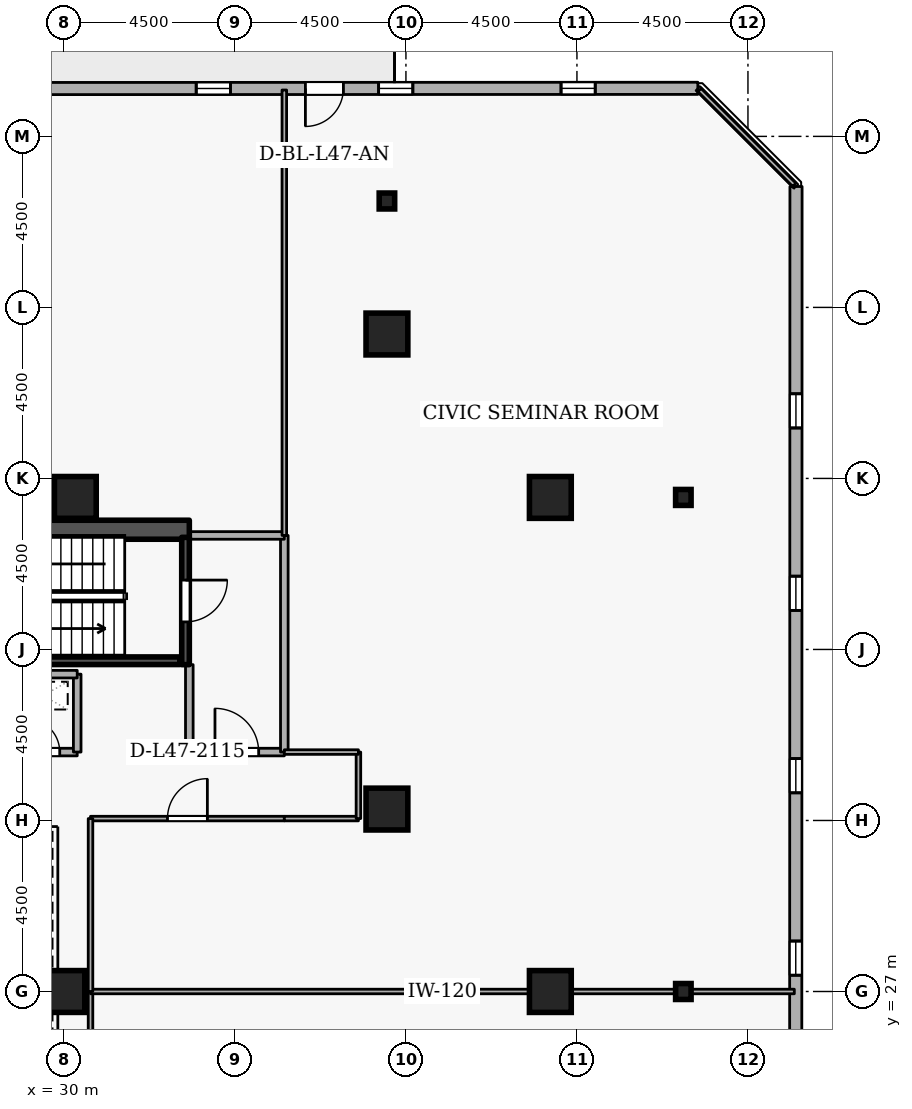
"""IFC4 building model, lengths in metres.
Left out: names, types, materials, properties, quantities, classifications, styles, units other than length and angle.
Written with IfcOpenShell. Run it as: python <this file> out.ifc"""

import sys

from ifc_helpers import new_model, si_unit, direction, frame, frame_2d, origin, origin_2d, place, context, subcontext, project, spatial, rectangle, i_section, extrude, element, fill, save


model = new_model("IFC4")
c1 = context("Model", 3, precision=1e-05, world=origin(), true_north=direction((0.0, 1.0)))
c2 = subcontext(c1, "Body", "Model", "MODEL_VIEW")
j1 = project(units=[si_unit("LENGTHUNIT", "METRE"), si_unit("PLANEANGLEUNIT", "RADIAN")], contexts=[c1])
p1 = place(None, origin())
s1 = spatial("IfcSite", under=j1, at=p1, CompositionType="ELEMENT")
p2 = place(p1, origin())
s2 = spatial("IfcBuilding", under=s1, at=p2, CompositionType="ELEMENT")
p3 = place(p2, frame((0.0, 0.0, 178.5)))
s3 = spatial("IfcBuildingStorey", under=s2, at=p3, CompositionType="ELEMENT", Elevation=178.5)
p4 = place(p3, frame((17.7, 39.15, 0.0), z_axis=(0.0, 0.0, 1.0), x_axis=(1.0, 0.0, 0.0)))
e1 = element("IfcWall", 1, at=p4, inside=s3, PredefinedType="SHEAR", context=c2, shape_type="SweptSolid", body=[
    extrude(rectangle(XDim=15.6, YDim=0.5, at=frame_2d((7.8, 0.0))), origin(), (0.0, 0.0, 1.0), 3.6),
])
for number, where, z_axis, x_axis in (
    (2, (42.8, 27.0, 0.0), (0.0, 0.0, 1.0), (1.0, 0.0, 0.0)),
    (3, (42.8, 40.0, 0.0), (0.0, 0.0, 1.0), (1.0, 0.0, 0.0)),
    (4, (38.5, 44.3, 0.0), (0.0, 0.0, 1.0), (1.0, 0.0, 0.0)),
    (5, (38.5, 31.8, 0.0), (0.0, 0.0, 1.0), (1.0, 0.0, 0.0)),
    (6, (30.3, 40.0, 0.0), (0.0, 0.0, 1.0), (1.0, 0.0, 0.0)),
    (7, (30.0, 27.0, 0.0), (0.0, 0.0, 1.0), (1.0, 0.0, 0.0)),
):
    element("IfcColumn", number, at=place(p3, frame(where, z_axis=z_axis, x_axis=x_axis)), inside=s3, PredefinedType="COLUMN", context=c2, shape_type="SweptSolid", body=[
        extrude(rectangle(XDim=1.1, YDim=1.1, at=origin_2d()), origin(), (0.0, 0.0, 1.0), 3.6),
    ])
for number, where, z_axis, x_axis in (
    (8, (46.3, 27.0, 0.0), (0.0, 0.0, 1.0), (1.0, 0.0, 0.0)),
    (9, (46.3, 40.0, 0.0), (0.0, 0.0, 1.0), (1.0, 0.0, 0.0)),
    (10, (38.5, 47.8, 0.0), (0.0, 0.0, 1.0), (1.0, 0.0, 0.0)),
):
    element("IfcColumn", number, at=place(p3, frame(where, z_axis=z_axis, x_axis=x_axis)), inside=s3, PredefinedType="COLUMN", context=c2, shape_type="SweptSolid", body=[
        extrude(i_section(OverallWidth=0.407, OverallDepth=0.419, WebThickness=0.031, FlangeThickness=0.049, FilletRadius=0.015, at=origin_2d()), origin(), (0.0, 0.0, 1.0), 3.6),
    ])
p5 = place(p3, frame((49.254, 15.128, 0.0), z_axis=(0.0, 0.0, 1.0), x_axis=(0.000332378036, 0.999999944762, 0.0)))
e11 = element("IfcWall", 11, at=p5, inside=s3, PredefinedType="STANDARD", context=c2, shape_type="SweptSolid", body=[
    extrude(rectangle(XDim=33.054, YDim=0.32, at=frame_2d((16.527, 0.0))), origin(), (0.0, 0.0, 1.0), 2.7),
])
p6 = place(p5, frame((2.7, 0.0, 0.72)))
e12 = element("IfcOpeningElement", 12, at=p6, cuts=e11, PredefinedType="OPENING", context=c2, shape_type="SweptSolid", body=[
    extrude(rectangle(XDim=0.9, YDim=1.75, at=frame_2d((0.45, 0.875))), frame((0.0, 0.17, 0.0), z_axis=(0.0, -1.0, 0.0), x_axis=(1.0, 0.0, 0.0)), (0.0, 0.0, 1.0), 0.34),
])
p7 = place(p5, frame((7.5, 0.0, 0.72)))
e13 = element("IfcOpeningElement", 13, at=p7, cuts=e11, PredefinedType="OPENING", context=c2, shape_type="SweptSolid", body=[
    extrude(rectangle(XDim=0.9, YDim=1.75, at=frame_2d((0.45, 0.875))), frame((0.0, 0.17, 0.0), z_axis=(0.0, -1.0, 0.0), x_axis=(1.0, 0.0, 0.0)), (0.0, 0.0, 1.0), 0.34),
])
p8 = place(p5, frame((12.3, 0.0, 0.72)))
e14 = element("IfcOpeningElement", 14, at=p8, cuts=e11, PredefinedType="OPENING", context=c2, shape_type="SweptSolid", body=[
    extrude(rectangle(XDim=0.9, YDim=1.75, at=frame_2d((0.45, 0.875))), frame((0.0, 0.17, 0.0), z_axis=(0.0, -1.0, 0.0), x_axis=(1.0, 0.0, 0.0)), (0.0, 0.0, 1.0), 0.34),
])
p9 = place(p5, frame((17.1, 0.0, 0.72)))
e15 = element("IfcOpeningElement", 15, at=p9, cuts=e11, PredefinedType="OPENING", context=c2, shape_type="SweptSolid", body=[
    extrude(rectangle(XDim=0.9, YDim=1.75, at=frame_2d((0.45, 0.875))), frame((0.0, 0.17, 0.0), z_axis=(0.0, -1.0, 0.0), x_axis=(1.0, 0.0, 0.0)), (0.0, 0.0, 1.0), 0.34),
])
p10 = place(p5, frame((21.9, 0.0, 0.72)))
e16 = element("IfcOpeningElement", 16, at=p10, cuts=e11, PredefinedType="OPENING", context=c2, shape_type="SweptSolid", body=[
    extrude(rectangle(XDim=0.9, YDim=1.75, at=frame_2d((0.45, 0.875))), frame((0.0, 0.17, 0.0), z_axis=(0.0, -1.0, 0.0), x_axis=(1.0, 0.0, 0.0)), (0.0, 0.0, 1.0), 0.34),
])
p11 = place(p5, frame((26.7, 0.0, 0.72)))
e17 = element("IfcOpeningElement", 17, at=p11, cuts=e11, PredefinedType="OPENING", context=c2, shape_type="SweptSolid", body=[
    extrude(rectangle(XDim=0.9, YDim=1.75, at=frame_2d((0.45, 0.875))), frame((0.0, 0.17, 0.0), z_axis=(0.0, -1.0, 0.0), x_axis=(1.0, 0.0, 0.0)), (0.0, 0.0, 1.0), 0.34),
])
p12 = place(p3, frame((46.681, 50.765, 0.0), z_axis=(0.0, 0.0, 1.0), x_axis=(-0.999999944762, -0.000332378036, 0.0)))
e18 = element("IfcWall", 18, at=p12, inside=s3, PredefinedType="STANDARD", context=c2, shape_type="SweptSolid", body=[
    extrude(rectangle(XDim=33.054, YDim=0.32, at=frame_2d((16.527, 0.0))), origin(), (0.0, 0.0, 1.0), 2.7),
])
p13 = place(p12, frame((9.327, 0.0, 0.0)))
e19 = element("IfcOpeningElement", 19, at=p13, cuts=e18, PredefinedType="OPENING", context=c2, shape_type="SweptSolid", body=[
    extrude(rectangle(XDim=1.0, YDim=2.08, at=frame_2d((0.5, 1.04))), frame((0.0, 0.17, 0.0), z_axis=(0.0, -1.0, 0.0), x_axis=(1.0, 0.0, 0.0)), (0.0, 0.0, 1.0), 0.34),
])
p14 = place(p12, frame((2.7, 0.0, 0.72)))
e20 = element("IfcOpeningElement", 20, at=p14, cuts=e18, PredefinedType="OPENING", context=c2, shape_type="SweptSolid", body=[
    extrude(rectangle(XDim=0.9, YDim=1.75, at=frame_2d((0.45, 0.875))), frame((0.0, 0.17, 0.0), z_axis=(0.0, -1.0, 0.0), x_axis=(1.0, 0.0, 0.0)), (0.0, 0.0, 1.0), 0.34),
])
p15 = place(p12, frame((7.5, 0.0, 0.72)))
e21 = element("IfcOpeningElement", 21, at=p15, cuts=e18, PredefinedType="OPENING", context=c2, shape_type="SweptSolid", body=[
    extrude(rectangle(XDim=0.9, YDim=1.75, at=frame_2d((0.45, 0.875))), frame((0.0, 0.17, 0.0), z_axis=(0.0, -1.0, 0.0), x_axis=(1.0, 0.0, 0.0)), (0.0, 0.0, 1.0), 0.34),
])
p16 = place(p12, frame((12.3, 0.0, 0.72)))
e22 = element("IfcOpeningElement", 22, at=p16, cuts=e18, PredefinedType="OPENING", context=c2, shape_type="SweptSolid", body=[
    extrude(rectangle(XDim=0.9, YDim=1.75, at=frame_2d((0.45, 0.875))), frame((0.0, 0.17, 0.0), z_axis=(0.0, -1.0, 0.0), x_axis=(1.0, 0.0, 0.0)), (0.0, 0.0, 1.0), 0.34),
])
p17 = place(p12, frame((17.1, 0.0, 0.72)))
e23 = element("IfcOpeningElement", 23, at=p17, cuts=e18, PredefinedType="OPENING", context=c2, shape_type="SweptSolid", body=[
    extrude(rectangle(XDim=0.9, YDim=1.75, at=frame_2d((0.45, 0.875))), frame((0.0, 0.17, 0.0), z_axis=(0.0, -1.0, 0.0), x_axis=(1.0, 0.0, 0.0)), (0.0, 0.0, 1.0), 0.34),
])
p18 = place(p12, frame((21.9, 0.0, 0.72)))
e24 = element("IfcOpeningElement", 24, at=p18, cuts=e18, PredefinedType="OPENING", context=c2, shape_type="SweptSolid", body=[
    extrude(rectangle(XDim=0.9, YDim=1.75, at=frame_2d((0.45, 0.875))), frame((0.0, 0.17, 0.0), z_axis=(0.0, -1.0, 0.0), x_axis=(1.0, 0.0, 0.0)), (0.0, 0.0, 1.0), 0.34),
])
p19 = place(p12, frame((26.7, 0.0, 0.72)))
e25 = element("IfcOpeningElement", 25, at=p19, cuts=e18, PredefinedType="OPENING", context=c2, shape_type="SweptSolid", body=[
    extrude(rectangle(XDim=0.9, YDim=1.75, at=frame_2d((0.45, 0.875))), frame((0.0, 0.17, 0.0), z_axis=(0.0, -1.0, 0.0), x_axis=(1.0, 0.0, 0.0)), (0.0, 0.0, 1.0), 0.34),
])
p20 = place(p3, frame((33.2, 38.95, 0.0), z_axis=(0.0, 0.0, 1.0), x_axis=(0.0, -1.0, 0.0)))
e26 = element("IfcWall", 26, at=p20, inside=s3, PredefinedType="SHEAR", context=c2, shape_type="SweptSolid", body=[
    extrude(rectangle(XDim=3.35, YDim=0.2, at=frame_2d((1.675, 0.0))), origin(), (0.0, 0.0, 1.0), 3.6),
])
p21 = place(p20, frame((1.125, 0.0, 0.0)))
e27 = element("IfcOpeningElement", 27, at=p21, cuts=e26, PredefinedType="OPENING", context=c2, shape_type="SweptSolid", body=[
    extrude(rectangle(XDim=1.1, YDim=2.1, at=frame_2d((0.55, 1.05))), frame((0.0, 0.11, 0.0), z_axis=(0.0, -1.0, 0.0), x_axis=(1.0, 0.0, 0.0)), (0.0, 0.0, 1.0), 0.22),
])
p22 = place(p3, frame((25.95, 35.703, 0.0), z_axis=(0.0, 0.0, 1.0), x_axis=(1.0, 0.0, 0.0)))
e28 = element("IfcWall", 28, at=p22, inside=s3, PredefinedType="SHEAR", context=c2, shape_type="SweptSolid", body=[
    extrude(rectangle(XDim=7.1, YDim=0.2, at=frame_2d((3.55, 0.0))), origin(), (0.0, 0.0, 1.0), 3.6),
])
p23 = place(p3, frame((33.3, 33.3, 0.0), z_axis=(0.0, 0.0, 1.0), x_axis=(1.0, 0.0, 0.0)))
e29 = element("IfcWall", 29, at=p23, inside=s3, PredefinedType="STANDARD", context=c2, shape_type="SweptSolid", body=[
    extrude(rectangle(XDim=2.5, YDim=0.2, at=frame_2d((1.25, 0.0))), origin(), (0.0, 0.0, 1.0), 3.34),
])
p24 = place(p23, frame((0.675, 0.0, 0.0)))
e30 = element("IfcOpeningElement", 30, at=p24, cuts=e29, PredefinedType="OPENING", context=c2, shape_type="SweptSolid", body=[
    extrude(rectangle(XDim=1.15, YDim=2.1, at=frame_2d((0.575, 1.05))), frame((0.0, 0.11, 0.0), z_axis=(0.0, -1.0, 0.0), x_axis=(1.0, 0.0, 0.0)), (0.0, 0.0, 1.0), 0.22),
])
p25 = place(p3, frame((35.8, 33.3, 0.0), z_axis=(0.0, 0.0, 1.0), x_axis=(0.0, 1.0, 0.0)))
e31 = element("IfcWall", 31, at=p25, inside=s3, PredefinedType="STANDARD", context=c2, shape_type="SweptSolid", body=[
    extrude(rectangle(XDim=5.7, YDim=0.2, at=frame_2d((2.85, 0.0))), origin(), (0.0, 0.0, 1.0), 3.34),
])
p26 = place(p3, frame((35.8, 39.0, 0.0), z_axis=(0.0, 0.0, 1.0), x_axis=(-1.0, 0.0, 0.0)))
e32 = element("IfcWall", 32, at=p26, inside=s3, PredefinedType="STANDARD", context=c2, shape_type="SweptSolid", body=[
    extrude(rectangle(XDim=2.5, YDim=0.2, at=frame_2d((1.25, 0.0))), origin(), (0.0, 0.0, 1.0), 3.34),
])
p27 = place(p3, frame((33.3, 35.6, 0.0), z_axis=(0.0, 0.0, 1.0), x_axis=(0.0, -1.0, 0.0)))
e33 = element("IfcWall", 33, at=p27, inside=s3, PredefinedType="STANDARD", context=c2, shape_type="SweptSolid", body=[
    extrude(rectangle(XDim=2.3, YDim=0.2, at=frame_2d((1.15, 0.0))), origin(), (0.0, 0.0, 1.0), 2.545),
])
p28 = place(p3, frame((28.55, 33.3, 0.0), z_axis=(0.0, 0.0, 1.0), x_axis=(1.0, 0.0, 0.0)))
e34 = element("IfcWall", 34, at=p28, inside=s3, PredefinedType="STANDARD", context=c2, shape_type="SweptSolid", body=[
    extrude(rectangle(XDim=1.8, YDim=0.2, at=frame_2d((0.9, 0.0))), origin(), (0.0, 0.0, 1.0), 3.34),
])
p29 = place(p28, frame((0.46, 0.0, 0.0)))
e35 = element("IfcOpeningElement", 35, at=p29, cuts=e34, PredefinedType="OPENING", context=c2, shape_type="SweptSolid", body=[
    extrude(rectangle(XDim=0.88, YDim=2.04, at=frame_2d((0.44, 1.02))), frame((0.0, 0.11, 0.0), z_axis=(0.0, -1.0, 0.0), x_axis=(1.0, 0.0, 0.0)), (0.0, 0.0, 1.0), 0.22),
])
p30 = place(p3, frame((30.35, 33.3, 0.0), z_axis=(0.0, 0.0, 1.0), x_axis=(0.0, 1.0, 0.0)))
e36 = element("IfcWall", 36, at=p30, inside=s3, PredefinedType="STANDARD", context=c2, shape_type="SweptSolid", body=[
    extrude(rectangle(XDim=2.05, YDim=0.2, at=frame_2d((1.025, 0.0))), origin(), (0.0, 0.0, 1.0), 3.34),
])
p31 = place(p3, frame((30.35, 35.35, 0.0), z_axis=(0.0, 0.0, 1.0), x_axis=(-1.0, 0.0, 0.0)))
e37 = element("IfcWall", 37, at=p31, inside=s3, PredefinedType="STANDARD", context=c2, shape_type="SweptSolid", body=[
    extrude(rectangle(XDim=1.8, YDim=0.2, at=frame_2d((0.9, 0.0))), origin(), (0.0, 0.0, 1.0), 3.34),
])
p32 = place(p3, frame((30.7, 22.45, 0.0), z_axis=(0.0, 0.0, 1.0), x_axis=(0.0, 1.0, 0.0)))
e38 = element("IfcWall", 38, at=p32, inside=s3, PredefinedType="PARTITIONING", context=c2, shape_type="SweptSolid", body=[
    extrude(rectangle(XDim=4.55, YDim=0.12, at=frame_2d((2.275, 0.0))), origin(), (0.0, 0.0, 1.0), 3.34),
])
p33 = place(p3, frame((30.7, 27.0, 0.0), z_axis=(0.0, 0.0, 1.0), x_axis=(1.0, 0.0, 0.0)))
e39 = element("IfcWall", 39, at=p33, inside=s3, PredefinedType="PARTITIONING", context=c2, shape_type="SweptSolid", body=[
    extrude(rectangle(XDim=18.52, YDim=0.12, at=frame_2d((9.26, 0.0))), origin(), (0.0, 0.0, 1.0), 2.932),
])
p34 = place(p3, frame((30.7, 31.55, 0.0), z_axis=(0.0, 0.0, 1.0), x_axis=(1.0, 0.0, 0.0)))
e40 = element("IfcWall", 40, at=p34, inside=s3, PredefinedType="PARTITIONING", context=c2, shape_type="SweptSolid", body=[
    extrude(rectangle(XDim=5.1, YDim=0.12, at=frame_2d((2.55, 0.0))), origin(), (0.0, 0.0, 1.0), 3.34),
])
p35 = place(p34, frame((2.025, 0.0, 0.0)))
e41 = element("IfcOpeningElement", 41, at=p35, cuts=e40, PredefinedType="OPENING", context=c2, shape_type="SweptSolid", body=[
    extrude(rectangle(XDim=1.05, YDim=2.1, at=frame_2d((0.525, 1.05))), frame((0.0, 0.07, 0.0), z_axis=(0.0, -1.0, 0.0), x_axis=(1.0, 0.0, 0.0)), (0.0, 0.0, 1.0), 0.14),
])
p36 = place(p3, frame((35.8, 31.55, 0.0), z_axis=(0.0, 0.0, 1.0), x_axis=(1.0, 0.0, 0.0)))
e42 = element("IfcWall", 42, at=p36, inside=s3, PredefinedType="PARTITIONING", context=c2, shape_type="SweptSolid", body=[
    extrude(rectangle(XDim=1.95, YDim=0.12, at=frame_2d((0.975, 0.0))), origin(), (0.0, 0.0, 1.0), 3.34),
])
p37 = place(p3, frame((37.75, 31.55, 0.0), z_axis=(0.0, 0.0, 1.0), x_axis=(0.0, 1.0, 0.0)))
e43 = element("IfcWall", 43, at=p37, inside=s3, PredefinedType="PARTITIONING", context=c2, shape_type="SweptSolid", body=[
    extrude(rectangle(XDim=1.75, YDim=0.12, at=frame_2d((0.875, 0.0))), origin(), (0.0, 0.0, 1.0), 3.34),
])
p38 = place(p3, frame((37.75, 33.3, 0.0), z_axis=(0.0, 0.0, 1.0), x_axis=(-1.0, 0.0, 0.0)))
e44 = element("IfcWall", 44, at=p38, inside=s3, PredefinedType="PARTITIONING", context=c2, shape_type="SweptSolid", body=[
    extrude(rectangle(XDim=1.95, YDim=0.12, at=frame_2d((0.975, 0.0))), origin(), (0.0, 0.0, 1.0), 3.34),
])
p39 = place(p3, frame((35.8, 39.0, 0.0), z_axis=(0.0, 0.0, 1.0), x_axis=(0.0, 1.0, 0.0)))
e45 = element("IfcWall", 45, at=p39, inside=s3, PredefinedType="PARTITIONING", context=c2, shape_type="SweptSolid", body=[
    extrude(rectangle(XDim=11.72, YDim=0.12, at=frame_2d((5.86, 0.0))), origin(), (0.0, 0.0, 1.0), 3.34),
])
p40 = place(p3, frame((46.725, 50.72, 0.0), z_axis=(0.0, 0.0, 1.0), x_axis=(0.707106781187, -0.707106781187, 0.0)))
e46 = element("IfcWall", 46, at=p40, inside=s3, PredefinedType="PARTITIONING", context=c2, shape_type="SweptSolid", body=[
    extrude(rectangle(XDim=3.528, YDim=0.12, at=frame_2d((1.764, 0.0))), origin(), (0.0, 0.0, 1.0), 3.34),
])
p41 = place(p3, frame((30.7, 27.0, 0.0), z_axis=(0.0, 0.0, 1.0), x_axis=(0.0, 1.0, 0.0)))
e47 = element("IfcWall", 47, at=p41, inside=s3, PredefinedType="PARTITIONING", context=c2, shape_type="SweptSolid", body=[
    extrude(rectangle(XDim=4.55, YDim=0.12, at=frame_2d((2.275, 0.0))), origin(), (0.0, 0.0, 1.0), 3.34),
])
p42 = place(p8, origin())
e48 = element("IfcWindow", 48, at=p42, inside=s3, PartitioningType="SINGLE_PANEL", PredefinedType="WINDOW", context=c2, shape_type="SweptSolid", body=[
    extrude(rectangle(XDim=0.9, YDim=1.75, at=frame_2d((0.45, 0.875))), frame((0.0, 0.03, 0.0), z_axis=(0.0, -1.0, 0.0), x_axis=(1.0, 0.0, 0.0)), (0.0, 0.0, 1.0), 0.06),
])
fill(e14, e48)
p43 = place(p9, origin())
e49 = element("IfcWindow", 49, at=p43, inside=s3, PartitioningType="SINGLE_PANEL", PredefinedType="WINDOW", context=c2, shape_type="SweptSolid", body=[
    extrude(rectangle(XDim=0.9, YDim=1.75, at=frame_2d((0.45, 0.875))), frame((0.0, 0.03, 0.0), z_axis=(0.0, -1.0, 0.0), x_axis=(1.0, 0.0, 0.0)), (0.0, 0.0, 1.0), 0.06),
])
fill(e15, e49)
p44 = place(p10, origin())
e50 = element("IfcWindow", 50, at=p44, inside=s3, PartitioningType="SINGLE_PANEL", PredefinedType="WINDOW", context=c2, shape_type="SweptSolid", body=[
    extrude(rectangle(XDim=0.9, YDim=1.75, at=frame_2d((0.45, 0.875))), frame((0.0, 0.03, 0.0), z_axis=(0.0, -1.0, 0.0), x_axis=(1.0, 0.0, 0.0)), (0.0, 0.0, 1.0), 0.06),
])
fill(e16, e50)
p45 = place(p11, origin())
e51 = element("IfcWindow", 51, at=p45, inside=s3, PartitioningType="SINGLE_PANEL", PredefinedType="WINDOW", context=c2, shape_type="SweptSolid", body=[
    extrude(rectangle(XDim=0.9, YDim=1.75, at=frame_2d((0.45, 0.875))), frame((0.0, 0.03, 0.0), z_axis=(0.0, -1.0, 0.0), x_axis=(1.0, 0.0, 0.0)), (0.0, 0.0, 1.0), 0.06),
])
fill(e17, e51)
p46 = place(p13, origin())
e52 = element("IfcDoor", 52, at=p46, inside=s3, OperationType="SINGLE_SWING_RIGHT", PredefinedType="DOOR", context=c2, shape_type="SweptSolid", body=[
    extrude(rectangle(XDim=1.0, YDim=2.08, at=frame_2d((0.5, 1.04))), frame((0.0, 0.025, 0.0), z_axis=(0.0, -1.0, 0.0), x_axis=(1.0, 0.0, 0.0)), (0.0, 0.0, 1.0), 0.05),
])
fill(e19, e52)
p47 = place(p14, origin())
e53 = element("IfcWindow", 53, at=p47, inside=s3, PartitioningType="SINGLE_PANEL", PredefinedType="WINDOW", context=c2, shape_type="SweptSolid", body=[
    extrude(rectangle(XDim=0.9, YDim=1.75, at=frame_2d((0.45, 0.875))), frame((0.0, 0.03, 0.0), z_axis=(0.0, -1.0, 0.0), x_axis=(1.0, 0.0, 0.0)), (0.0, 0.0, 1.0), 0.06),
])
fill(e20, e53)
p48 = place(p15, origin())
e54 = element("IfcWindow", 54, at=p48, inside=s3, PartitioningType="SINGLE_PANEL", PredefinedType="WINDOW", context=c2, shape_type="SweptSolid", body=[
    extrude(rectangle(XDim=0.9, YDim=1.75, at=frame_2d((0.45, 0.875))), frame((0.0, 0.03, 0.0), z_axis=(0.0, -1.0, 0.0), x_axis=(1.0, 0.0, 0.0)), (0.0, 0.0, 1.0), 0.06),
])
fill(e21, e54)
p49 = place(p16, origin())
e55 = element("IfcWindow", 55, at=p49, inside=s3, PartitioningType="SINGLE_PANEL", PredefinedType="WINDOW", context=c2, shape_type="SweptSolid", body=[
    extrude(rectangle(XDim=0.9, YDim=1.75, at=frame_2d((0.45, 0.875))), frame((0.0, 0.03, 0.0), z_axis=(0.0, -1.0, 0.0), x_axis=(1.0, 0.0, 0.0)), (0.0, 0.0, 1.0), 0.06),
])
fill(e22, e55)
p50 = place(p21, origin())
e56 = element("IfcDoor", 56, at=p50, inside=s3, OperationType="SINGLE_SWING_LEFT", PredefinedType="DOOR", context=c2, shape_type="SweptSolid", body=[
    extrude(rectangle(XDim=1.1, YDim=2.1, at=frame_2d((0.55, 1.05))), frame((0.0, 0.025, 0.0), z_axis=(0.0, -1.0, 0.0), x_axis=(1.0, 0.0, 0.0)), (0.0, 0.0, 1.0), 0.05),
])
fill(e27, e56)
p51 = place(p24, origin())
e57 = element("IfcDoor", 57, at=p51, inside=s3, OperationType="SINGLE_SWING_LEFT", PredefinedType="DOOR", context=c2, shape_type="SweptSolid", body=[
    extrude(rectangle(XDim=1.15, YDim=2.1, at=frame_2d((0.575, 1.05))), frame((0.0, 0.025, 0.0), z_axis=(0.0, -1.0, 0.0), x_axis=(1.0, 0.0, 0.0)), (0.0, 0.0, 1.0), 0.05),
])
fill(e30, e57)
p52 = place(p29, origin())
e58 = element("IfcDoor", 58, at=p52, inside=s3, OperationType="SINGLE_SWING_LEFT", PredefinedType="DOOR", context=c2, shape_type="SweptSolid", body=[
    extrude(rectangle(XDim=0.88, YDim=2.04, at=frame_2d((0.44, 1.02))), frame((0.0, 0.025, 0.0), z_axis=(0.0, -1.0, 0.0), x_axis=(1.0, 0.0, 0.0)), (0.0, 0.0, 1.0), 0.05),
])
fill(e35, e58)
p53 = place(p35, origin())
e59 = element("IfcDoor", 59, at=p53, inside=s3, OperationType="SINGLE_SWING_RIGHT", PredefinedType="DOOR", context=c2, shape_type="SweptSolid", body=[
    extrude(rectangle(XDim=1.05, YDim=2.1, at=frame_2d((0.525, 1.05))), frame((0.0, 0.025, 0.0), z_axis=(0.0, -1.0, 0.0), x_axis=(1.0, 0.0, 0.0)), (0.0, 0.0, 1.0), 0.05),
])
fill(e41, e59)
save(model, sys.argv[1])
